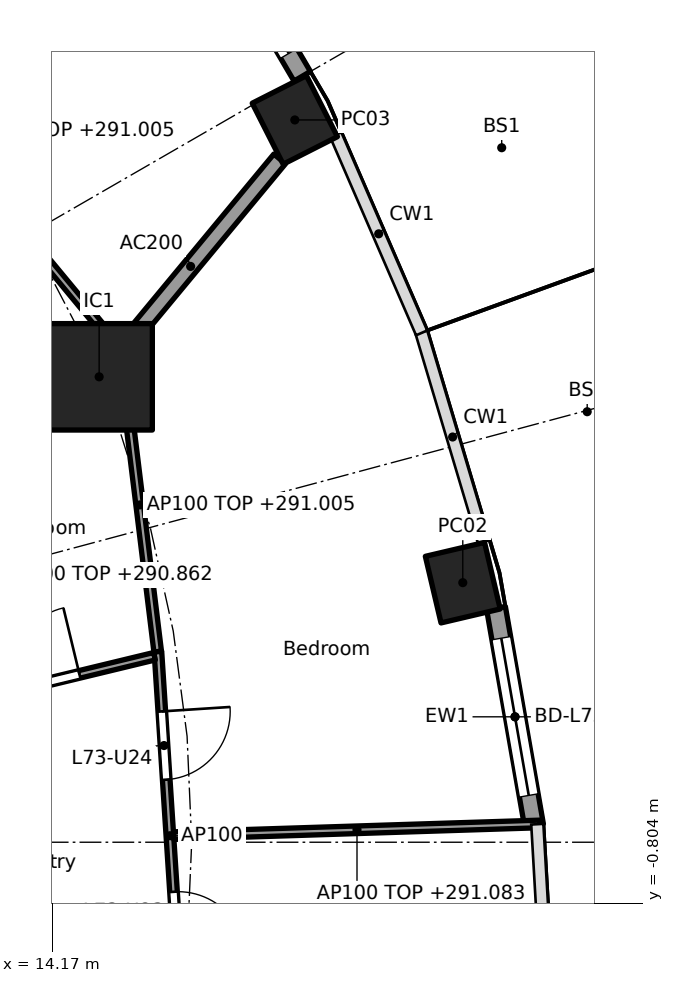
"""IFC4 building model, lengths in metres.
Left out: names, types, materials, properties, quantities, classifications, styles, units other than length and angle.
Written with IfcOpenShell. Run it as: python <this file> out.ifc"""

import sys

from ifc_helpers import new_model, si_unit, direction, frame, frame_2d, origin, origin_2d, place, context, subcontext, project, spatial, rectangle, hollow_rectangle, extrude, element, fill, save


model = new_model("IFC4")
c1 = context("Model", 3, precision=1e-05, world=origin(), true_north=direction((0.0, 1.0)))
c2 = subcontext(c1, "Body", "Model", "MODEL_VIEW")
j1 = project(units=[si_unit("LENGTHUNIT", "METRE"), si_unit("PLANEANGLEUNIT", "RADIAN")], contexts=[c1])
p1 = place(None, origin())
s1 = spatial("IfcSite", under=j1, at=p1, CompositionType="ELEMENT")
p2 = place(p1, origin())
s2 = spatial("IfcBuilding", under=s1, at=p2, CompositionType="ELEMENT")
p3 = place(p2, frame((0.0, 0.0, 288.1)))
s3 = spatial("IfcBuildingStorey", under=s2, at=p3, CompositionType="ELEMENT", Elevation=288.1)
for number, where, z_axis, x_axis in (
    (1, (19.566, 3.415, 0.0), (0.0, 0.0, 1.0), (-0.229, 0.973, 0.0)),
    (2, (17.356, 9.502, 0.0), (0.0, 0.0, 1.0), (-0.452, 0.892, 0.0)),
):
    element("IfcColumn", number, at=place(p3, frame(where, z_axis=z_axis, x_axis=x_axis)), inside=s3, PredefinedType="COLUMN", context=c2, shape_type="SweptSolid", body=[
        extrude(hollow_rectangle(XDim=0.9, YDim=0.8, WallThickness=0.028, at=origin_2d()), origin(), (0.0, 0.0, 1.0), 3.7),
    ])
p4 = place(p3, frame((14.782, 6.123, 0.0), z_axis=(0.0, 0.0, 1.0), x_axis=(1.0, 0.0, 0.0)))
e3 = element("IfcColumn", 3, at=p4, inside=s3, PredefinedType="COLUMN", context=c2, shape_type="SweptSolid", body=[
    extrude(rectangle(XDim=1.4, YDim=1.4, at=origin_2d()), origin(), (0.0, 0.0, 1.0), 3.7),
])
p5 = place(p3, frame((20.004, 3.08, 0.0), z_axis=(0.0, 0.0, 1.0), x_axis=(0.172182411767, -0.985065082661, 0.0)))
e4 = element("IfcWall", 4, at=p5, inside=s3, PredefinedType="SOLIDWALL", context=c2, shape_type="SweptSolid", body=[
    extrude(rectangle(XDim=2.903, YDim=0.25, at=frame_2d((1.451, 0.0))), origin(), (0.0, 0.0, 1.0), 3.44),
])
p6 = place(p5, frame((0.401, 0.0, 0.0)))
e5 = element("IfcOpeningElement", 5, at=p6, cuts=e4, PredefinedType="OPENING", context=c2, shape_type="SweptSolid", body=[
    extrude(rectangle(XDim=2.1, YDim=2.4, at=frame_2d((1.05, 1.2))), frame((0.0, 0.135, 0.0), z_axis=(0.0, -1.0, 0.0), x_axis=(1.0, 0.0, 0.0)), (0.0, 0.0, 1.0), 0.27),
])
p7 = place(p3, frame((16.038, 12.489, 0.0), z_axis=(0.0, 0.0, 1.0), x_axis=(0.506371364425, -0.862315511452, 0.0)))
e6 = element("IfcWall", 6, at=p7, inside=s3, PredefinedType="SOLIDWALL", context=c2, shape_type="SweptSolid", body=[
    extrude(rectangle(XDim=2.796, YDim=0.25, at=frame_2d((1.398, 0.0))), origin(), (0.0, 0.0, 1.0), 3.44),
])
p8 = place(p7, frame((0.348, 0.0, 0.0)))
e7 = element("IfcOpeningElement", 7, at=p8, cuts=e6, PredefinedType="OPENING", context=c2, shape_type="SweptSolid", body=[
    extrude(rectangle(XDim=2.1, YDim=2.4, at=frame_2d((1.05, 1.2))), frame((0.0, 0.135, 0.0), z_axis=(0.0, -1.0, 0.0), x_axis=(1.0, 0.0, 0.0)), (0.0, 0.0, 1.0), 0.27),
])
p9 = place(p3, frame((12.657, 5.243, 0.0), z_axis=(0.0, 0.0, 1.0), x_axis=(0.923853160736, 0.382747093259, 0.0)))
e8 = element("IfcWall", 8, at=p9, inside=s3, PredefinedType="PARTITIONING", context=c2, shape_type="SweptSolid", body=[
    extrude(rectangle(XDim=2.2, YDim=0.2, at=frame_2d((1.1, 0.0))), origin(), (0.0, 0.0, 1.0), 3.44),
])
p10 = place(p3, frame((14.814, 6.161, 0.0), z_axis=(0.0, 0.0, 1.0), x_axis=(0.638050520313, 0.769994502272, 0.0)))
e9 = element("IfcWall", 9, at=p10, inside=s3, PredefinedType="PARTITIONING", context=c2, shape_type="SweptSolid", body=[
    extrude(rectangle(XDim=3.673, YDim=0.2, at=frame_2d((1.836, 0.0))), origin(), (0.0, 0.0, 1.0), 3.44),
])
p11 = place(p3, frame((15.87, -2.338, 0.0), z_axis=(0.0, 0.0, 1.0), x_axis=(-0.064797294757, 0.997898447034, 0.0)))
e10 = element("IfcWall", 10, at=p11, inside=s3, PredefinedType="PARTITIONING", context=c2, shape_type="SweptSolid", body=[
    extrude(rectangle(XDim=4.857, YDim=0.1, at=frame_2d((2.428, 0.0))), origin(), (0.0, 0.0, 1.0), 3.44),
])
p12 = place(p11, frame((0.789, 0.0, 0.0)))
e11 = element("IfcOpeningElement", 11, at=p12, cuts=e10, PredefinedType="OPENING", context=c2, shape_type="SweptSolid", body=[
    extrude(rectangle(XDim=0.9, YDim=2.1, at=frame_2d((0.45, 1.05))), frame((0.0, 0.06, 0.0), z_axis=(0.0, -1.0, 0.0), x_axis=(1.0, 0.0, 0.0)), (0.0, 0.0, 1.0), 0.12),
])
p13 = place(p11, frame((3.167, 0.0, 0.0)))
e12 = element("IfcOpeningElement", 12, at=p13, cuts=e10, PredefinedType="OPENING", context=c2, shape_type="SweptSolid", body=[
    extrude(rectangle(XDim=0.9, YDim=2.1, at=frame_2d((0.45, 1.05))), frame((0.0, 0.06, 0.0), z_axis=(0.0, -1.0, 0.0), x_axis=(1.0, 0.0, 0.0)), (0.0, 0.0, 1.0), 0.12),
])
p14 = place(p3, frame((15.763, 0.087, 0.0), z_axis=(0.0, 0.0, 1.0), x_axis=(0.999492034598, 0.03186962151, 0.0)))
e13 = element("IfcWall", 13, at=p14, inside=s3, PredefinedType="PARTITIONING", context=c2, shape_type="SweptSolid", body=[
    extrude(rectangle(XDim=4.826, YDim=0.1, at=frame_2d((2.413, 0.0))), origin(), (0.0, 0.0, 1.0), 2.983),
])
p15 = place(p3, frame((12.662, 1.758, 0.0), z_axis=(0.0, 0.0, 1.0), x_axis=(0.972004827836, 0.234960879007, 0.0)))
e14 = element("IfcWall", 14, at=p15, inside=s3, PredefinedType="PARTITIONING", context=c2, shape_type="SweptSolid", body=[
    extrude(rectangle(XDim=2.93, YDim=0.1, at=frame_2d((1.465, 0.0))), origin(), (0.0, 0.0, 1.0), 2.762),
])
p16 = place(p15, frame((1.015, 0.0, 0.0)))
e15 = element("IfcOpeningElement", 15, at=p16, cuts=e14, PredefinedType="OPENING", context=c2, shape_type="SweptSolid", body=[
    extrude(rectangle(XDim=0.9, YDim=2.1, at=frame_2d((0.45, 1.05))), frame((0.0, 0.06, 0.0), z_axis=(0.0, -1.0, 0.0), x_axis=(1.0, 0.0, 0.0)), (0.0, 0.0, 1.0), 0.12),
])
p17 = place(p3, frame((15.552, 2.508, 0.0), z_axis=(0.0, 0.0, 1.0), x_axis=(-0.12196293976, 0.992534654974, 0.0)))
e16 = element("IfcWall", 16, at=p17, inside=s3, PredefinedType="PARTITIONING", context=c2, shape_type="SweptSolid", body=[
    extrude(rectangle(XDim=3.887, YDim=0.1, at=frame_2d((1.944, 0.0))), origin(), (0.0, 0.0, 1.0), 2.905),
])
p18 = place(p3, frame((15.002, 6.543, 0.0), z_axis=(0.0, 0.0, 1.0), x_axis=(-0.637932656528, 0.770092154054, 0.0)))
e17 = element("IfcWall", 17, at=p18, inside=s3, PredefinedType="PARTITIONING", context=c2, shape_type="SweptSolid", body=[
    extrude(rectangle(XDim=6.311, YDim=0.1, at=frame_2d((3.155, 0.0))), origin(), (0.0, 0.0, 1.0), 2.905),
])
p19 = place(p18, frame((4.22, 0.0, 0.0)))
e18 = element("IfcOpeningElement", 18, at=p19, cuts=e17, PredefinedType="OPENING", context=c2, shape_type="SweptSolid", body=[
    extrude(rectangle(XDim=0.9, YDim=2.1, at=frame_2d((0.45, 1.05))), frame((0.0, 0.06, 0.0), z_axis=(0.0, -1.0, 0.0), x_axis=(1.0, 0.0, 0.0)), (0.0, 0.0, 1.0), 0.12),
])
p20 = place(p6, origin())
e19 = element("IfcDoor", 19, at=p20, inside=s3, OperationType="SLIDING_TO_LEFT", PredefinedType="DOOR", context=c2, shape_type="SweptSolid", body=[
    extrude(rectangle(XDim=2.1, YDim=2.4, at=frame_2d((1.05, 1.2))), frame((0.0, 0.025, 0.0), z_axis=(0.0, -1.0, 0.0), x_axis=(1.0, 0.0, 0.0)), (0.0, 0.0, 1.0), 0.05),
])
fill(e5, e19)
p21 = place(p8, origin())
e20 = element("IfcDoor", 20, at=p21, inside=s3, OperationType="SLIDING_TO_LEFT", PredefinedType="DOOR", context=c2, shape_type="SweptSolid", body=[
    extrude(rectangle(XDim=2.1, YDim=2.4, at=frame_2d((1.05, 1.2))), frame((0.0, 0.025, 0.0), z_axis=(0.0, -1.0, 0.0), x_axis=(1.0, 0.0, 0.0)), (0.0, 0.0, 1.0), 0.05),
])
fill(e7, e20)
p22 = place(p16, origin())
e21 = element("IfcDoor", 21, at=p22, inside=s3, OperationType="SINGLE_SWING_RIGHT", PredefinedType="DOOR", context=c2, shape_type="SweptSolid", body=[
    extrude(rectangle(XDim=0.9, YDim=2.1, at=frame_2d((0.45, 1.05))), frame((0.0, 0.025, 0.0), z_axis=(0.0, -1.0, 0.0), x_axis=(1.0, 0.0, 0.0)), (0.0, 0.0, 1.0), 0.05),
])
fill(e15, e21)
p23 = place(p12, frame((0.9, 0.0, 0.0), x_axis=(-1.0, 0.0, 0.0)))
e22 = element("IfcDoor", 22, at=p23, inside=s3, OperationType="SINGLE_SWING_RIGHT", PredefinedType="DOOR", context=c2, shape_type="SweptSolid", body=[
    extrude(rectangle(XDim=0.9, YDim=2.1, at=frame_2d((0.45, 1.05))), frame((0.0, 0.025, 0.0), z_axis=(0.0, -1.0, 0.0), x_axis=(1.0, 0.0, 0.0)), (0.0, 0.0, 1.0), 0.05),
])
fill(e11, e22)
p24 = place(p13, frame((0.9, 0.0, 0.0), x_axis=(-1.0, 0.0, 0.0)))
e23 = element("IfcDoor", 23, at=p24, inside=s3, OperationType="SINGLE_SWING_LEFT", PredefinedType="DOOR", context=c2, shape_type="SweptSolid", body=[
    extrude(rectangle(XDim=0.9, YDim=2.1, at=frame_2d((0.45, 1.05))), frame((0.0, 0.025, 0.0), z_axis=(0.0, -1.0, 0.0), x_axis=(1.0, 0.0, 0.0)), (0.0, 0.0, 1.0), 0.05),
])
fill(e12, e23)
save(model, sys.argv[1])
